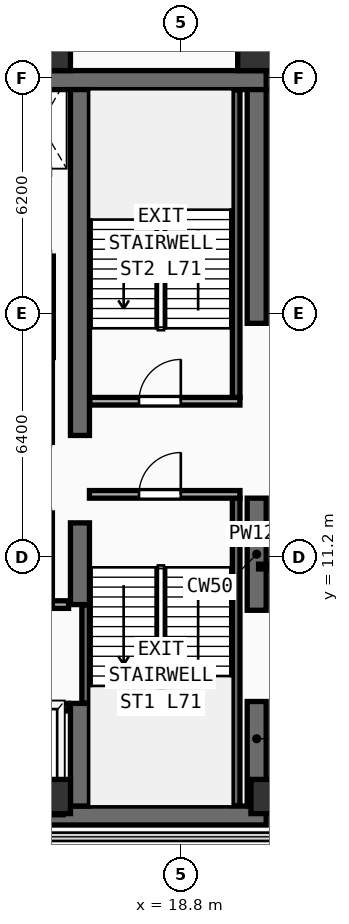
"""IFC4 building model, lengths in metres.
Left out: names, types, materials, properties, quantities, classifications, styles, units other than length and angle.
Written with IfcOpenShell. Run it as: python <this file> out.ifc"""

import sys

from ifc_helpers import new_model, si_unit, direction, frame, frame_2d, origin, origin_2d, place, context, subcontext, project, spatial, rectangle, extrude, element, fill, save


model = new_model("IFC4")
c1 = context("Model", 3, precision=1e-05, world=origin(), true_north=direction((0.0, 1.0)))
c2 = subcontext(c1, "Body", "Model", "MODEL_VIEW")
j1 = project(units=[si_unit("LENGTHUNIT", "METRE"), si_unit("PLANEANGLEUNIT", "RADIAN")], contexts=[c1])
p1 = place(None, origin())
s1 = spatial("IfcSite", under=j1, at=p1, CompositionType="ELEMENT")
p2 = place(p1, origin())
s2 = spatial("IfcBuilding", under=s1, at=p2, CompositionType="ELEMENT")
p3 = place(p2, frame((0.0, 0.0, 278.0)))
s3 = spatial("IfcBuildingStorey", under=s2, at=p3, CompositionType="ELEMENT", Elevation=278.0)
for number, where, z_axis, x_axis in (
    (1, (7.2, 4.4, 0.0), (0.0, 0.0, 1.0), (1.0, 0.0, 0.0)),
    (2, (7.2, 23.75, 0.0), (0.0, 0.0, 1.0), (1.0, 0.0, 0.0)),
):
    element("IfcWall", number, at=place(p3, frame(where, z_axis=z_axis, x_axis=x_axis)), inside=s3, PredefinedType="SHEAR", context=c2, shape_type="SweptSolid", body=[
        extrude(rectangle(XDim=13.85, YDim=0.5, at=frame_2d((6.925, 0.0))), origin(), (0.0, 0.0, 1.0), 3.56),
    ])
p4 = place(p3, frame((20.8, 4.65, 0.0), z_axis=(0.0, 0.0, 1.0), x_axis=(0.0, 1.0, 0.0)))
e3 = element("IfcWall", 3, at=p4, inside=s3, PredefinedType="SHEAR", context=c2, shape_type="SweptSolid", body=[
    extrude(rectangle(XDim=2.75, YDim=0.5, at=frame_2d((1.375, 0.0))), origin(), (0.0, 0.0, 1.0), 3.56),
])
p5 = place(p3, frame((20.8, 9.8, 0.0), z_axis=(0.0, 0.0, 1.0), x_axis=(0.0, 1.0, 0.0)))
e4 = element("IfcWall", 4, at=p5, inside=s3, PredefinedType="SHEAR", context=c2, shape_type="SweptSolid", body=[
    extrude(rectangle(XDim=2.95, YDim=0.5, at=frame_2d((1.475, 0.0))), origin(), (0.0, 0.0, 1.0), 3.56),
])
p6 = place(p3, frame((20.8, 17.35, 0.0), z_axis=(0.0, 0.0, 1.0), x_axis=(0.0, 1.0, 0.0)))
e5 = element("IfcWall", 5, at=p6, inside=s3, PredefinedType="SHEAR", context=c2, shape_type="SweptSolid", body=[
    extrude(rectangle(XDim=6.15, YDim=0.5, at=frame_2d((3.075, 0.0))), origin(), (0.0, 0.0, 1.0), 3.56),
])
p7 = place(p3, frame((16.15, 4.65, 0.0), z_axis=(0.0, 0.0, 1.0), x_axis=(0.0, 1.0, 0.0)))
e6 = element("IfcWall", 6, at=p7, inside=s3, PredefinedType="SHEAR", context=c2, shape_type="SweptSolid", body=[
    extrude(rectangle(XDim=2.7, YDim=0.5, at=frame_2d((1.35, 0.0))), origin(), (0.0, 0.0, 1.0), 3.56),
])
p8 = place(p3, frame((16.15, 9.95, 0.0), z_axis=(0.0, 0.0, 1.0), x_axis=(0.0, 1.0, 0.0)))
e7 = element("IfcWall", 7, at=p8, inside=s3, PredefinedType="SHEAR", context=c2, shape_type="SweptSolid", body=[
    extrude(rectangle(XDim=2.15, YDim=0.5, at=frame_2d((1.075, 0.0))), origin(), (0.0, 0.0, 1.0), 3.56),
])
p9 = place(p3, frame((16.15, 14.4, 0.0), z_axis=(0.0, 0.0, 1.0), x_axis=(0.0, 1.0, 0.0)))
e8 = element("IfcWall", 8, at=p9, inside=s3, PredefinedType="SHEAR", context=c2, shape_type="SweptSolid", body=[
    extrude(rectangle(XDim=9.1, YDim=0.5, at=frame_2d((4.55, 0.0))), origin(), (0.0, 0.0, 1.0), 3.56),
])
for number, where, z_axis, x_axis in (
    (9, (15.45, 4.9, 0.0), (0.0, 0.0, 1.0), (1.0, 0.0, 0.0)),
    (10, (21.1, 4.9, 0.0), (0.0, 0.0, 1.0), (1.0, 0.0, 0.0)),
    (11, (15.45, 24.45, 0.0), (0.0, 0.0, 1.0), (1.0, 0.0, 0.0)),
    (12, (20.75, 24.45, 0.0), (0.0, 0.0, 1.0), (1.0, 0.0, 0.0)),
):
    element("IfcColumn", number, at=place(p3, frame(where, z_axis=z_axis, x_axis=x_axis)), inside=s3, PredefinedType="COLUMN", context=c2, shape_type="SweptSolid", body=[
        extrude(rectangle(XDim=0.9, YDim=0.9, at=origin_2d()), origin(), (0.0, 0.0, 1.0), 3.56),
    ])
p10 = place(p3, frame((27.643, 19.733, 0.0), z_axis=(0.0, 0.0, 1.0), x_axis=(-0.707106781187, 0.707106781187, 0.0)))
e13 = element("IfcWall", 13, at=p10, inside=s3, PredefinedType="SOLIDWALL", context=c2, shape_type="SweptSolid", body=[
    extrude(rectangle(XDim=9.207, YDim=0.28, at=frame_2d((4.603, 0.0))), origin(), (0.0, 0.0, 1.0), 3.56),
])
p11 = place(p3, frame((16.3, 7.36, 0.0), z_axis=(0.0, 0.0, 1.0), x_axis=(0.0, 1.0, 0.0)))
e14 = element("IfcWall", 14, at=p11, inside=s3, PredefinedType="SHEAR", context=c2, shape_type="SweptSolid", body=[
    extrude(rectangle(XDim=2.58, YDim=0.2, at=frame_2d((1.29, 0.0))), origin(), (0.0, 0.0, 1.0), 3.56),
])
p12 = place(p3, frame((20.26, 4.66, 0.0), z_axis=(0.0, 0.0, 1.0), x_axis=(0.0, 1.0, 0.0)))
e15 = element("IfcWall", 15, at=p12, inside=s3, PredefinedType="SHEAR", context=c2, shape_type="SweptSolid", body=[
    extrude(rectangle(XDim=8.09, YDim=0.2, at=frame_2d((4.045, 0.0))), origin(), (0.0, 0.0, 1.0), 3.56),
])
p13 = place(p3, frame((16.4, 12.85, 0.0), z_axis=(0.0, 0.0, 1.0), x_axis=(1.0, 0.0, 0.0)))
e16 = element("IfcWall", 16, at=p13, inside=s3, PredefinedType="PARTITIONING", context=c2, shape_type="SweptSolid", body=[
    extrude(rectangle(XDim=3.96, YDim=0.2, at=frame_2d((1.98, 0.0))), origin(), (0.0, 0.0, 1.0), 3.56),
])
p14 = place(p13, frame((1.304, 0.0, 0.0)))
e17 = element("IfcOpeningElement", 17, at=p14, cuts=e16, PredefinedType="OPENING", context=c2, shape_type="SweptSolid", body=[
    extrude(rectangle(XDim=1.1, YDim=2.2, at=frame_2d((0.55, 1.1))), frame((0.0, 0.11, 0.0), z_axis=(0.0, -1.0, 0.0), x_axis=(1.0, 0.0, 0.0)), (0.0, 0.0, 1.0), 0.22),
])
p15 = place(p3, frame((20.26, 15.4, 0.0), z_axis=(0.0, 0.0, 1.0), x_axis=(0.0, 1.0, 0.0)))
e18 = element("IfcWall", 18, at=p15, inside=s3, PredefinedType="SHEAR", context=c2, shape_type="SweptSolid", body=[
    extrude(rectangle(XDim=8.09, YDim=0.2, at=frame_2d((4.045, 0.0))), origin(), (0.0, 0.0, 1.0), 3.56),
])
p16 = place(p3, frame((16.41, 15.3, 0.0), z_axis=(0.0, 0.0, 1.0), x_axis=(1.0, 0.0, 0.0)))
e19 = element("IfcWall", 19, at=p16, inside=s3, PredefinedType="PARTITIONING", context=c2, shape_type="SweptSolid", body=[
    extrude(rectangle(XDim=3.95, YDim=0.2, at=frame_2d((1.975, 0.0))), origin(), (0.0, 0.0, 1.0), 3.56),
])
p17 = place(p16, frame((1.294, 0.0, 0.0)))
e20 = element("IfcOpeningElement", 20, at=p17, cuts=e19, PredefinedType="OPENING", context=c2, shape_type="SweptSolid", body=[
    extrude(rectangle(XDim=1.1, YDim=2.2, at=frame_2d((0.55, 1.1))), frame((0.0, 0.11, 0.0), z_axis=(0.0, -1.0, 0.0), x_axis=(1.0, 0.0, 0.0)), (0.0, 0.0, 1.0), 0.22),
])
p18 = place(p3, frame((7.5, 7.25, 0.0), z_axis=(0.0, 0.0, 1.0), x_axis=(1.0, 0.0, 0.0)))
e21 = element("IfcWall", 21, at=p18, inside=s3, PredefinedType="PARTITIONING", context=c2, shape_type="SweptSolid", body=[
    extrude(rectangle(XDim=8.35, YDim=0.2, at=frame_2d((4.175, 0.0))), origin(), (0.0, 0.0, 1.0), 3.56),
])
p19 = place(p18, frame((0.53, 0.0, 0.0)))
e22 = element("IfcOpeningElement", 22, at=p19, cuts=e21, PredefinedType="OPENING", context=c2, shape_type="SweptSolid", body=[
    extrude(rectangle(XDim=1.1, YDim=2.2, at=frame_2d((0.55, 1.1))), frame((0.0, 0.11, 0.0), z_axis=(0.0, -1.0, 0.0), x_axis=(1.0, 0.0, 0.0)), (0.0, 0.0, 1.0), 0.22),
])
p20 = place(p18, frame((2.37, 0.0, 0.0)))
e23 = element("IfcOpeningElement", 23, at=p20, cuts=e21, PredefinedType="OPENING", context=c2, shape_type="SweptSolid", body=[
    extrude(rectangle(XDim=1.1, YDim=2.2, at=frame_2d((0.55, 1.1))), frame((0.0, 0.11, 0.0), z_axis=(0.0, -1.0, 0.0), x_axis=(1.0, 0.0, 0.0)), (0.0, 0.0, 1.0), 0.22),
])
p21 = place(p18, frame((4.33, 0.0, 0.0)))
e24 = element("IfcOpeningElement", 24, at=p21, cuts=e21, PredefinedType="OPENING", context=c2, shape_type="SweptSolid", body=[
    extrude(rectangle(XDim=1.1, YDim=2.2, at=frame_2d((0.55, 1.1))), frame((0.0, 0.11, 0.0), z_axis=(0.0, -1.0, 0.0), x_axis=(1.0, 0.0, 0.0)), (0.0, 0.0, 1.0), 0.22),
])
p22 = place(p18, frame((6.5, 0.0, 0.0)))
e25 = element("IfcOpeningElement", 25, at=p22, cuts=e21, PredefinedType="OPENING", context=c2, shape_type="SweptSolid", body=[
    extrude(rectangle(XDim=1.1, YDim=2.2, at=frame_2d((0.55, 1.1))), frame((0.0, 0.11, 0.0), z_axis=(0.0, -1.0, 0.0), x_axis=(1.0, 0.0, 0.0)), (0.0, 0.0, 1.0), 0.22),
])
p23 = place(p3, frame((7.5, 9.95, 0.0), z_axis=(0.0, 0.0, 1.0), x_axis=(1.0, 0.0, 0.0)))
e26 = element("IfcWall", 26, at=p23, inside=s3, PredefinedType="PARTITIONING", context=c2, shape_type="SweptSolid", body=[
    extrude(rectangle(XDim=8.35, YDim=0.2, at=frame_2d((4.175, 0.0))), origin(), (0.0, 0.0, 1.0), 3.56),
])
p24 = place(p3, frame((15.35, 9.95, 0.0), z_axis=(0.0, 0.0, 1.0), x_axis=(0.0, 1.0, 0.0)))
e27 = element("IfcWall", 27, at=p24, inside=s3, PredefinedType="PARTITIONING", context=c2, shape_type="SweptSolid", body=[
    extrude(rectangle(XDim=2.41, YDim=0.15, at=frame_2d((1.205, 0.0))), origin(), (0.0, 0.0, 1.0), 3.56),
])
p25 = place(p3, frame((15.35, 14.22, 0.0), z_axis=(0.0, 0.0, 1.0), x_axis=(0.0, 1.0, 0.0)))
e28 = element("IfcWall", 28, at=p25, inside=s3, PredefinedType="PARTITIONING", context=c2, shape_type="SweptSolid", body=[
    extrude(rectangle(XDim=2.23, YDim=0.15, at=frame_2d((1.115, 0.0))), origin(), (0.0, 0.0, 1.0), 3.56),
])
p26 = place(p3, frame((15.35, 16.45, 0.0), z_axis=(0.0, 0.0, 1.0), x_axis=(0.0, 1.0, 0.0)))
e29 = element("IfcWall", 29, at=p26, inside=s3, PredefinedType="PARTITIONING", context=c2, shape_type="SweptSolid", body=[
    extrude(rectangle(XDim=2.67, YDim=0.2, at=frame_2d((1.335, 0.0))), origin(), (0.0, 0.0, 1.0), 3.56),
])
p27 = place(p3, frame((20.85, 10.95, 0.0), z_axis=(0.0, 0.0, 1.0), x_axis=(1.0, 0.0, 0.0)))
e30 = element("IfcWall", 30, at=p27, inside=s3, PredefinedType="PARTITIONING", context=c2, shape_type="SweptSolid", body=[
    extrude(rectangle(XDim=2.85, YDim=0.125, at=frame_2d((1.425, 0.0))), origin(), (0.0, 0.0, 1.0), 3.56),
])
p28 = place(p27, frame((0.971, 0.0, 0.0)))
e31 = element("IfcOpeningElement", 31, at=p28, cuts=e30, PredefinedType="OPENING", context=c2, shape_type="SweptSolid", body=[
    extrude(rectangle(XDim=0.95, YDim=2.15, at=frame_2d((0.475, 1.075))), frame((0.0, 0.073, 0.0), z_axis=(0.0, -1.0, 0.0), x_axis=(1.0, 0.0, 0.0)), (0.0, 0.0, 1.0), 0.145),
])
p29 = place(p14, frame((1.1, 0.0, 0.0), z_axis=(0.0, 0.0, 1.0), x_axis=(-1.0, 0.0, 0.0)))
e32 = element("IfcDoor", 32, at=p29, inside=s3, OperationType="SINGLE_SWING_LEFT", PredefinedType="DOOR", context=c2, shape_type="SweptSolid", body=[
    extrude(rectangle(XDim=1.1, YDim=2.2, at=frame_2d((0.55, 1.1))), frame((0.0, 0.025, 0.0), z_axis=(0.0, -1.0, 0.0), x_axis=(1.0, 0.0, 0.0)), (0.0, 0.0, 1.0), 0.05),
])
fill(e17, e32)
p30 = place(p17, origin())
e33 = element("IfcDoor", 33, at=p30, inside=s3, OperationType="SINGLE_SWING_RIGHT", PredefinedType="DOOR", context=c2, shape_type="SweptSolid", body=[
    extrude(rectangle(XDim=1.1, YDim=2.2, at=frame_2d((0.55, 1.1))), frame((0.0, 0.025, 0.0), z_axis=(0.0, -1.0, 0.0), x_axis=(1.0, 0.0, 0.0)), (0.0, 0.0, 1.0), 0.05),
])
fill(e20, e33)
save(model, sys.argv[1])
